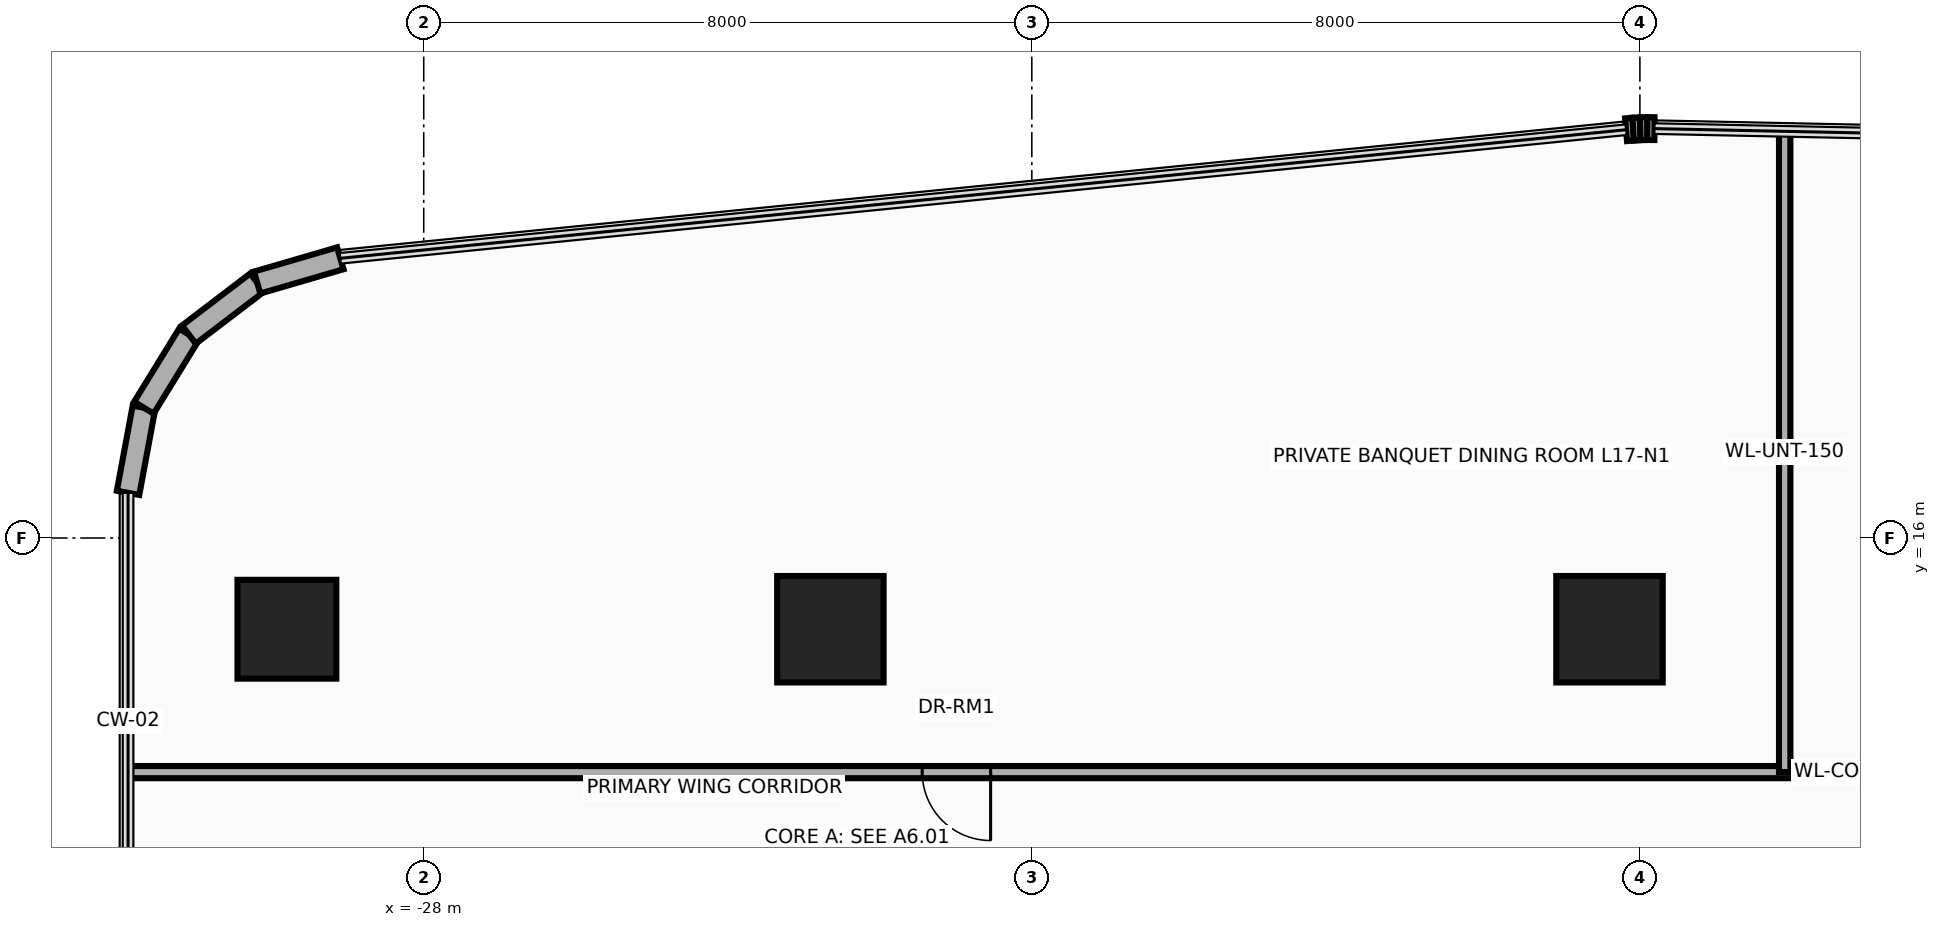
"""IFC4 building model, lengths in metres.
Left out: names, types, materials, properties, quantities, classifications, styles, units other than length and angle.
Written with IfcOpenShell. Run it as: python <this file> out.ifc"""

import sys

from ifc_helpers import new_model, si_unit, direction, frame, frame_2d, origin, origin_2d, place, context, subcontext, project, spatial, rectangle, circle, extrude, source, transform, mapped, element, fill, save


model = new_model("IFC4")
c1 = context("Model", 3, precision=1e-05, world=origin(), true_north=direction((0.0, 1.0)))
c2 = subcontext(c1, "Body", "Model", "MODEL_VIEW")
j1 = project(units=[si_unit("LENGTHUNIT", "METRE"), si_unit("PLANEANGLEUNIT", "RADIAN")], contexts=[c1])
p1 = place(None, origin())
s1 = spatial("IfcSite", under=j1, at=p1, CompositionType="ELEMENT")
p2 = place(p1, origin())
s2 = spatial("IfcBuilding", under=s1, at=p2, CompositionType="ELEMENT")
p3 = place(p2, frame((0.0, 0.0, 70.4)))
s3 = spatial("IfcBuildingStorey", under=s2, at=p3, CompositionType="ELEMENT", Elevation=70.4)
m1 = source(origin(), c2, "Body", "SweptSolid", [
    extrude(circle(Radius=0.65, at=origin_2d()), origin(), (0.0, 0.0, 1.0), 3.7),
])
p4 = place(p3, frame((-29.8, 14.8, 0.0), z_axis=(0.0, 0.0, 1.0), x_axis=(1.0, 0.0, 0.0)))
e1 = element("IfcColumn", 1, at=p4, inside=s3, PredefinedType="COLUMN", context=c2, shape_type="MappedRepresentation", body=[
    mapped(m1, transform((0.0, 0.0, 0.0), x_axis=(1.0, 0.0, 0.0), y_axis=(0.0, 1.0, 0.0), z_axis=(0.0, 0.0, 1.0), scale=1.0)),
])
m2 = source(origin(), c2, "Body", "SweptSolid", [
    extrude(rectangle(XDim=1.4, YDim=1.4, at=origin_2d()), origin(), (0.0, 0.0, 1.0), 3.7),
])
for number, where, z_axis, x_axis in (
    (2, (-22.65, 14.8, 0.0), (0.0, 0.0, 1.0), (1.0, 0.0, 0.0)),
    (3, (-12.4, 14.8, 0.0), (0.0, 0.0, 1.0), (1.0, 0.0, 0.0)),
):
    element("IfcColumn", number, at=place(p3, frame(where, z_axis=z_axis, x_axis=x_axis)), inside=s3, PredefinedType="COLUMN", context=c2, shape_type="MappedRepresentation", body=[
        mapped(m2, transform((0.0, 0.0, 0.0), x_axis=(1.0, 0.0, 0.0), y_axis=(0.0, 1.0, 0.0), z_axis=(0.0, 0.0, 1.0), scale=1.0)),
    ])
p5 = place(p3, frame((-31.89, 16.594, 0.0), z_axis=(0.0, 0.0, 1.0), x_axis=(0.182748995683, 0.9831596028, 0.0)))
e4 = element("IfcWall", 4, at=p5, inside=s3, PredefinedType="SOLIDWALL", context=c2, shape_type="SweptSolid", body=[
    extrude(rectangle(XDim=1.14, YDim=0.3, at=frame_2d((0.57, 0.0))), origin(), (0.0, 0.0, 1.0), 3.46),
])
p6 = place(p3, frame((-31.682, 17.714, 0.0), z_axis=(0.0, 0.0, 1.0), x_axis=(0.524157723014, 0.8516212077, 0.0)))
e5 = element("IfcWall", 5, at=p6, inside=s3, PredefinedType="SOLIDWALL", context=c2, shape_type="SweptSolid", body=[
    extrude(rectangle(XDim=1.129, YDim=0.3, at=frame_2d((0.565, 0.0))), origin(), (0.0, 0.0, 1.0), 3.46),
])
p7 = place(p3, frame((-31.09, 18.676, 0.0), z_axis=(0.0, 0.0, 1.0), x_axis=(0.795253002434, 0.606277710393, 0.0)))
e6 = element("IfcWall", 6, at=p7, inside=s3, PredefinedType="SOLIDWALL", context=c2, shape_type="SweptSolid", body=[
    extrude(rectangle(XDim=1.129, YDim=0.3, at=frame_2d((0.564, 0.0))), origin(), (0.0, 0.0, 1.0), 3.46),
])
p8 = place(p3, frame((-30.192, 19.361, 0.0), z_axis=(0.0, 0.0, 1.0), x_axis=(0.960071941549, 0.279753225271, 0.0)))
e7 = element("IfcWall", 7, at=p8, inside=s3, PredefinedType="SOLIDWALL", context=c2, shape_type="SweptSolid", body=[
    extrude(rectangle(XDim=1.14, YDim=0.3, at=frame_2d((0.57, 0.0))), origin(), (0.0, 0.0, 1.0), 3.46),
])
p9 = place(p3, frame((-12.182, 21.371, 0.0), z_axis=(0.0, 0.0, 1.0), x_axis=(0.996527790842, 0.08326080759, 0.0)))
e8 = element("IfcWall", 8, at=p9, inside=s3, PredefinedType="SOLIDWALL", context=c2, shape_type="SweptSolid", body=[
    extrude(rectangle(XDim=0.094, YDim=0.3, at=frame_2d((0.047, 0.0))), origin(), (0.0, 0.0, 1.0), 3.46),
])
p10 = place(p3, frame((-12.088, 21.379, 0.0), z_axis=(0.0, 0.0, 1.0), x_axis=(0.998476480444, 0.055178963393, 0.0)))
e9 = element("IfcWall", 9, at=p10, inside=s3, PredefinedType="SOLIDWALL", context=c2, shape_type="SweptSolid", body=[
    extrude(rectangle(XDim=0.093, YDim=0.3, at=frame_2d((0.046, 0.0))), origin(), (0.0, 0.0, 1.0), 3.46),
])
p11 = place(p3, frame((-11.996, 21.384, 0.0), z_axis=(0.0, 0.0, 1.0), x_axis=(0.999722573757, 0.023553673204, 0.0)))
e10 = element("IfcWall", 10, at=p11, inside=s3, PredefinedType="SOLIDWALL", context=c2, shape_type="SweptSolid", body=[
    extrude(rectangle(XDim=0.093, YDim=0.3, at=frame_2d((0.047, 0.0))), origin(), (0.0, 0.0, 1.0), 3.46),
])
p12 = place(p3, frame((-11.902, 21.386, 0.0), z_axis=(0.0, 0.0, 1.0), x_axis=(0.999986507273, -0.005194735103, 0.0)))
e11 = element("IfcWall", 11, at=p12, inside=s3, PredefinedType="SOLIDWALL", context=c2, shape_type="SweptSolid", body=[
    extrude(rectangle(XDim=0.094, YDim=0.3, at=frame_2d((0.047, 0.0))), origin(), (0.0, 0.0, 1.0), 3.46),
])
p13 = place(p3, frame((-31.89, 12.92, 0.0), z_axis=(0.0, 0.0, 1.0), x_axis=(1.0, 0.0, 0.0)))
e12 = element("IfcWall", 12, at=p13, inside=s3, PredefinedType="PARTITIONING", context=c2, shape_type="SweptSolid", body=[
    extrude(rectangle(XDim=45.44, YDim=0.16, at=frame_2d((22.72, 0.0))), origin(), (0.0, 0.0, 1.0), 2.583),
])
p14 = place(p13, frame((10.448, 0.0, 0.0)))
e13 = element("IfcOpeningElement", 13, at=p14, cuts=e12, PredefinedType="OPENING", context=c2, shape_type="SweptSolid", body=[
    extrude(rectangle(XDim=0.9, YDim=2.1, at=frame_2d((0.45, 1.05))), frame((0.0, 0.095, 0.0), z_axis=(0.0, -1.0, 0.0), x_axis=(1.0, 0.0, 0.0)), (0.0, 0.0, 1.0), 0.19),
])
p15 = place(p13, frame((33.167, 0.0, 0.0)))
e14 = element("IfcOpeningElement", 14, at=p15, cuts=e12, PredefinedType="OPENING", context=c2, shape_type="SweptSolid", body=[
    extrude(rectangle(XDim=0.9, YDim=2.1, at=frame_2d((0.45, 1.05))), frame((0.0, 0.095, 0.0), z_axis=(0.0, -1.0, 0.0), x_axis=(1.0, 0.0, 0.0)), (0.0, 0.0, 1.0), 0.19),
])
p16 = place(p3, frame((-10.095, 12.92, 0.0), z_axis=(0.0, 0.0, 1.0), x_axis=(0.0, 1.0, 0.0)))
e15 = element("IfcWall", 15, at=p16, inside=s3, PredefinedType="PARTITIONING", context=c2, shape_type="SweptSolid", body=[
    extrude(rectangle(XDim=8.43, YDim=0.15, at=frame_2d((4.215, 0.0))), origin(), (0.0, 0.0, 1.0), 2.583),
])
p17 = place(p14, frame((0.9, 0.0, 0.0), z_axis=(0.0, 0.0, 1.0), x_axis=(-1.0, 0.0, 0.0)))
e16 = element("IfcDoor", 16, at=p17, inside=s3, OperationType="SINGLE_SWING_LEFT", PredefinedType="DOOR", context=c2, shape_type="SweptSolid", body=[
    extrude(rectangle(XDim=0.9, YDim=2.1, at=frame_2d((0.45, 1.05))), frame((0.0, 0.025, 0.0), z_axis=(0.0, -1.0, 0.0), x_axis=(1.0, 0.0, 0.0)), (0.0, 0.0, 1.0), 0.05),
])
fill(e13, e16)
save(model, sys.argv[1])
